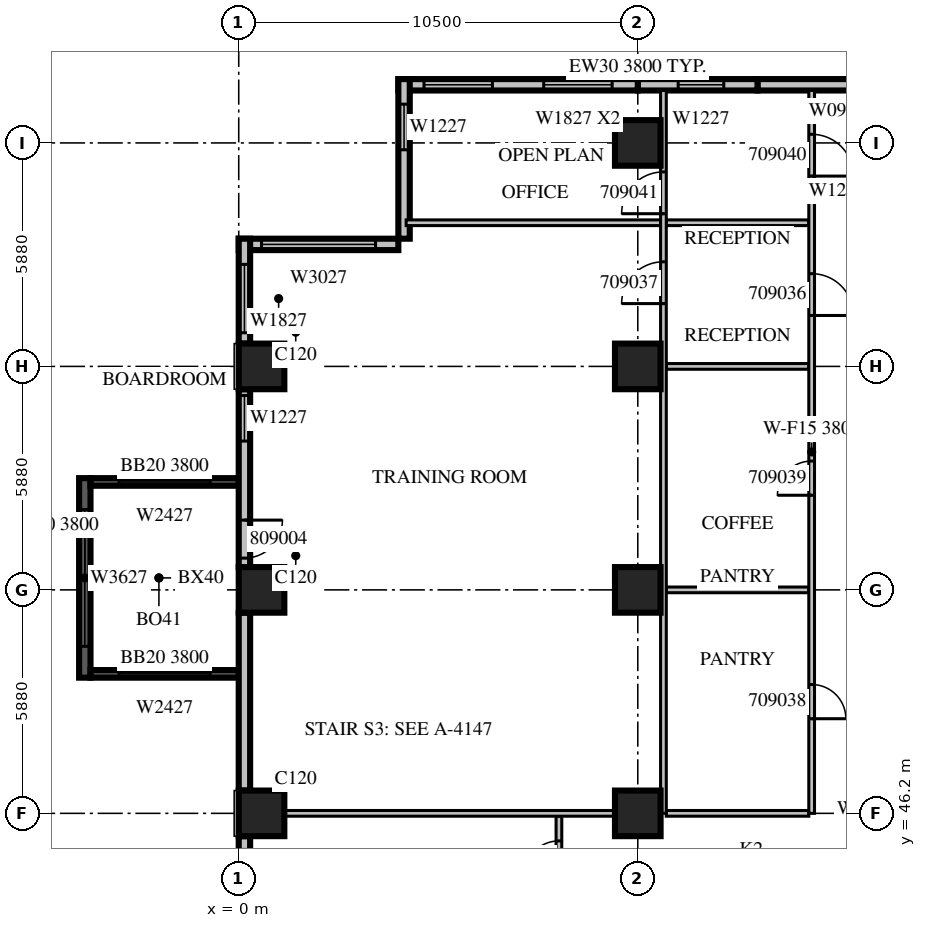
"""IFC4 building model, lengths in metres.
Left out: names, types, materials, properties, quantities, classifications, styles, units other than length and angle.
Written with IfcOpenShell. Run it as: python <this file> out.ifc"""

import sys

from ifc_helpers import new_model, si_unit, direction, frame, frame_2d, origin, origin_2d, place, context, subcontext, project, spatial, rectangle, extrude, source, transform, mapped, element, fill, save


model = new_model("IFC4")
c1 = context("Model", 3, precision=1e-05, world=origin(), true_north=direction((0.0, 1.0)))
c2 = subcontext(c1, "Body", "Model", "MODEL_VIEW")
j1 = project(units=[si_unit("LENGTHUNIT", "METRE"), si_unit("PLANEANGLEUNIT", "RADIAN")], contexts=[c1])
p1 = place(None, origin())
s1 = spatial("IfcSite", under=j1, at=p1, CompositionType="ELEMENT")
p2 = place(p1, origin())
s2 = spatial("IfcBuilding", under=s1, at=p2, CompositionType="ELEMENT")
p3 = place(p2, frame((0.0, 0.0, 48.9)))
s3 = spatial("IfcBuildingStorey", under=s2, at=p3, CompositionType="ELEMENT", Elevation=48.9)
m1 = source(origin(), c2, "Body", "SweptSolid", [
    extrude(rectangle(XDim=1.2, YDim=1.2, at=origin_2d()), origin(), (0.0, 0.0, 1.0), 4.2),
])
for number, where, z_axis, x_axis in (
    (1, (0.6, 46.2, 0.0), (0.0, 0.0, 1.0), (1.0, 0.0, 0.0)),
    (2, (10.5, 46.2, 0.0), (0.0, 0.0, 1.0), (1.0, 0.0, 0.0)),
    (3, (0.6, 52.08, 0.0), (0.0, 0.0, 1.0), (1.0, 0.0, 0.0)),
    (4, (10.5, 52.08, 0.0), (0.0, 0.0, 1.0), (1.0, 0.0, 0.0)),
    (5, (0.6, 57.96, 0.0), (0.0, 0.0, 1.0), (1.0, 0.0, 0.0)),
    (6, (10.5, 57.96, 0.0), (0.0, 0.0, 1.0), (1.0, 0.0, 0.0)),
    (7, (10.5, 63.84, 0.0), (0.0, 0.0, 1.0), (1.0, 0.0, 0.0)),
):
    element("IfcColumn", number, at=place(p3, frame(where, z_axis=z_axis, x_axis=x_axis)), inside=s3, PredefinedType="COLUMN", context=c2, shape_type="MappedRepresentation", body=[
        mapped(m1, transform((0.0, 0.0, 0.0), scale=1.0)),
    ])
p4 = place(p3, frame((-4.05, 55.02, 0.0), z_axis=(0.0, 0.0, 1.0), x_axis=(0.0, -1.0, 0.0)))
e8 = element("IfcWall", 8, at=p4, inside=s3, PredefinedType="SOLIDWALL", context=c2, shape_type="SweptSolid", body=[
    extrude(rectangle(XDim=5.25, YDim=0.3, at=frame_2d((2.625, 0.0))), origin(), (0.0, 0.0, 1.0), 3.8),
])
m2 = source(origin(), c2, "Body", "SweptSolid", [
    extrude(rectangle(XDim=3.6, YDim=2.7, at=frame_2d((1.8, 1.35))), frame((0.0, 0.16, 0.0), z_axis=(0.0, -1.0, 0.0), x_axis=(1.0, 0.0, 0.0)), (0.0, 0.0, 1.0), 0.32),
])
p5 = place(p4, frame((0.825, 0.0, 0.6)))
e9 = element("IfcOpeningElement", 9, at=p5, cuts=e8, PredefinedType="OPENING", context=c2, shape_type="MappedRepresentation", body=[
    mapped(m2, transform((0.0, 0.0, 0.0), scale=1.0)),
])
m3 = source(origin(), c2, "Body", "SweptSolid", [
    extrude(rectangle(XDim=3.9, YDim=0.2, at=frame_2d((1.95, 0.0))), origin(), (0.0, 0.0, 1.0), 3.8),
])
p6 = place(p3, frame((0.0, 54.92, 0.0), z_axis=(0.0, 0.0, 1.0), x_axis=(-1.0, 0.0, 0.0)))
e10 = element("IfcWall", 10, at=p6, inside=s3, PredefinedType="SOLIDWALL", context=c2, shape_type="MappedRepresentation", body=[
    mapped(m3, transform((0.0, 0.0, 0.0), scale=1.0)),
])
m4 = source(origin(), c2, "Body", "SweptSolid", [
    extrude(rectangle(XDim=2.4, YDim=2.7, at=frame_2d((1.2, 1.35))), frame((0.0, 0.11, 0.0), z_axis=(0.0, -1.0, 0.0), x_axis=(1.0, 0.0, 0.0)), (0.0, 0.0, 1.0), 0.22),
])
p7 = place(p6, frame((0.75, 0.0, 0.6)))
e11 = element("IfcOpeningElement", 11, at=p7, cuts=e10, PredefinedType="OPENING", context=c2, shape_type="MappedRepresentation", body=[
    mapped(m4, transform((0.0, 0.0, 0.0), scale=1.0)),
])
p8 = place(p3, frame((0.0, 49.87, 0.0), z_axis=(0.0, 0.0, 1.0), x_axis=(-1.0, 0.0, 0.0)))
e12 = element("IfcWall", 12, at=p8, inside=s3, PredefinedType="SOLIDWALL", context=c2, shape_type="MappedRepresentation", body=[
    mapped(m3, transform((0.0, 0.0, 0.0), scale=1.0)),
])
p9 = place(p8, frame((0.75, 0.0, 0.6)))
e13 = element("IfcOpeningElement", 13, at=p9, cuts=e12, PredefinedType="OPENING", context=c2, shape_type="MappedRepresentation", body=[
    mapped(m4, transform((0.0, 0.0, 0.0), scale=1.0)),
])
m5 = source(origin(), c2, "Body", "SweptSolid", [
    extrude(rectangle(XDim=3.15, YDim=0.3, at=frame_2d((1.575, 0.0))), origin(), (0.0, 0.0, 1.0), 3.8),
])
p10 = place(p3, frame((16.8, 65.37, 0.0), z_axis=(0.0, 0.0, 1.0), x_axis=(-1.0, 0.0, 0.0)))
e14 = element("IfcWall", 14, at=p10, inside=s3, PredefinedType="STANDARD", context=c2, shape_type="MappedRepresentation", body=[
    mapped(m5, transform((0.0, 0.0, 0.0), scale=1.0)),
])
p11 = place(p3, frame((13.65, 65.37, 0.0), z_axis=(0.0, 0.0, 1.0), x_axis=(-1.0, 0.0, 0.0)))
e15 = element("IfcWall", 15, at=p11, inside=s3, PredefinedType="STANDARD", context=c2, shape_type="MappedRepresentation", body=[
    mapped(m5, transform((0.0, 0.0, 0.0), scale=1.0)),
])
m6 = source(origin(), c2, "Body", "SweptSolid", [
    extrude(rectangle(XDim=1.2, YDim=2.7, at=frame_2d((0.6, 1.35))), frame((0.0, 0.16, 0.0), z_axis=(0.0, -1.0, 0.0), x_axis=(1.0, 0.0, 0.0)), (0.0, 0.0, 1.0), 0.32),
])
p12 = place(p11, frame((0.887, 0.0, 0.6)))
e16 = element("IfcOpeningElement", 16, at=p12, cuts=e15, PredefinedType="OPENING", context=c2, shape_type="MappedRepresentation", body=[
    mapped(m6, transform((0.0, 0.0, 0.0), scale=1.0)),
])
m7 = source(origin(), c2, "Body", "SweptSolid", [
    extrude(rectangle(XDim=6.3, YDim=0.3, at=frame_2d((3.15, 0.0))), origin(), (0.0, 0.0, 1.0), 3.8),
])
p13 = place(p3, frame((10.5, 65.37, 0.0), z_axis=(0.0, 0.0, 1.0), x_axis=(-1.0, 0.0, 0.0)))
e17 = element("IfcWall", 17, at=p13, inside=s3, PredefinedType="STANDARD", context=c2, shape_type="MappedRepresentation", body=[
    mapped(m7, transform((0.0, 0.0, 0.0), scale=1.0)),
])
m8 = source(origin(), c2, "Body", "SweptSolid", [
    extrude(rectangle(XDim=1.8, YDim=2.7, at=frame_2d((0.9, 1.35))), frame((0.0, 0.16, 0.0), z_axis=(0.0, -1.0, 0.0), x_axis=(1.0, 0.0, 0.0)), (0.0, 0.0, 1.0), 0.32),
])
p14 = place(p13, frame((0.675, 0.0, 0.6)))
e18 = element("IfcOpeningElement", 18, at=p14, cuts=e17, PredefinedType="OPENING", context=c2, shape_type="MappedRepresentation", body=[
    mapped(m8, transform((0.0, 0.0, 0.0), scale=1.0)),
])
p15 = place(p13, frame((3.825, 0.0, 0.6)))
e19 = element("IfcOpeningElement", 19, at=p15, cuts=e17, PredefinedType="OPENING", context=c2, shape_type="MappedRepresentation", body=[
    mapped(m8, transform((0.0, 0.0, 0.0), scale=1.0)),
])
m9 = source(origin(), c2, "Body", "SweptSolid", [
    extrude(rectangle(XDim=4.2, YDim=0.3, at=frame_2d((2.1, 0.0))), origin(), (0.0, 0.0, 1.0), 3.8),
])
p16 = place(p3, frame((4.35, 65.52, 0.0), z_axis=(0.0, 0.0, 1.0), x_axis=(0.0, -1.0, 0.0)))
e20 = element("IfcWall", 20, at=p16, inside=s3, PredefinedType="STANDARD", context=c2, shape_type="MappedRepresentation", body=[
    mapped(m9, transform((0.0, 0.0, 0.0), scale=1.0)),
])
p17 = place(p16, frame((0.66, 0.0, 0.6)))
e21 = element("IfcOpeningElement", 21, at=p17, cuts=e20, PredefinedType="OPENING", context=c2, shape_type="MappedRepresentation", body=[
    mapped(m6, transform((0.0, 0.0, 0.0), scale=1.0)),
])
p18 = place(p3, frame((4.2, 61.17, 0.0), z_axis=(0.0, 0.0, 1.0), x_axis=(-1.0, 0.0, 0.0)))
e22 = element("IfcWall", 22, at=p18, inside=s3, PredefinedType="STANDARD", context=c2, shape_type="MappedRepresentation", body=[
    mapped(m9, transform((0.0, 0.0, 0.0), scale=1.0)),
])
m10 = source(origin(), c2, "Body", "SweptSolid", [
    extrude(rectangle(XDim=3.0, YDim=2.7, at=frame_2d((1.5, 1.35))), frame((0.0, 0.16, 0.0), z_axis=(0.0, -1.0, 0.0), x_axis=(1.0, 0.0, 0.0)), (0.0, 0.0, 1.0), 0.32),
])
p19 = place(p18, frame((0.6, 0.0, 0.6)))
e23 = element("IfcOpeningElement", 23, at=p19, cuts=e22, PredefinedType="OPENING", context=c2, shape_type="MappedRepresentation", body=[
    mapped(m10, transform((0.0, 0.0, 0.0), scale=1.0)),
])
m11 = source(origin(), c2, "Body", "SweptSolid", [
    extrude(rectangle(XDim=2.76, YDim=0.3, at=frame_2d((1.38, 0.0))), origin(), (0.0, 0.0, 1.0), 3.8),
])
p20 = place(p3, frame((0.15, 61.32, 0.0), z_axis=(0.0, 0.0, 1.0), x_axis=(0.0, -1.0, 0.0)))
e24 = element("IfcWall", 24, at=p20, inside=s3, PredefinedType="STANDARD", context=c2, shape_type="MappedRepresentation", body=[
    mapped(m11, transform((0.0, 0.0, 0.0), scale=1.0)),
])
p21 = place(p20, frame((0.675, 0.0, 0.6)))
e25 = element("IfcOpeningElement", 25, at=p21, cuts=e24, PredefinedType="OPENING", context=c2, shape_type="MappedRepresentation", body=[
    mapped(m8, transform((0.0, 0.0, 0.0), scale=1.0)),
])
m12 = source(origin(), c2, "Body", "SweptSolid", [
    extrude(rectangle(XDim=4.68, YDim=0.3, at=frame_2d((2.34, 0.0))), origin(), (0.0, 0.0, 1.0), 3.8),
])
p22 = place(p3, frame((0.15, 57.36, 0.0), z_axis=(0.0, 0.0, 1.0), x_axis=(0.0, -1.0, 0.0)))
e26 = element("IfcWall", 26, at=p22, inside=s3, PredefinedType="STANDARD", context=c2, shape_type="MappedRepresentation", body=[
    mapped(m12, transform((0.0, 0.0, 0.0), scale=1.0)),
])
p23 = place(p22, frame((0.165, 0.0, 0.6)))
e27 = element("IfcOpeningElement", 27, at=p23, cuts=e26, PredefinedType="OPENING", context=c2, shape_type="MappedRepresentation", body=[
    mapped(m6, transform((0.0, 0.0, 0.0), scale=1.0)),
])
m13 = source(origin(), c2, "Body", "SweptSolid", [
    extrude(rectangle(XDim=1.0, YDim=2.1, at=frame_2d((0.5, 1.05))), frame((0.0, 0.16, 0.0), z_axis=(0.0, -1.0, 0.0), x_axis=(1.0, 0.0, 0.0)), (0.0, 0.0, 1.0), 0.32),
])
p24 = place(p22, frame((3.444, 0.0, 0.0)))
e28 = element("IfcOpeningElement", 28, at=p24, cuts=e26, PredefinedType="OPENING", context=c2, shape_type="MappedRepresentation", body=[
    mapped(m13, transform((0.0, 0.0, 0.0), scale=1.0)),
])
p25 = place(p3, frame((0.15, 51.48, 0.0), z_axis=(0.0, 0.0, 1.0), x_axis=(0.0, -1.0, 0.0)))
e29 = element("IfcWall", 29, at=p25, inside=s3, PredefinedType="STANDARD", context=c2, shape_type="MappedRepresentation", body=[
    mapped(m12, transform((0.0, 0.0, 0.0), scale=1.0)),
])
m14 = source(origin(), c2, "Body", "SweptSolid", [
    extrude(rectangle(XDim=1.6, YDim=0.3, at=frame_2d((0.8, 0.0))), origin(), (0.0, 0.0, 1.0), 3.8),
])
p26 = place(p3, frame((0.15, 45.6, 0.0), z_axis=(0.0, 0.0, 1.0), x_axis=(0.0, -1.0, 0.0)))
e30 = element("IfcWall", 30, at=p26, inside=s3, PredefinedType="STANDARD", context=c2, shape_type="MappedRepresentation", body=[
    mapped(m14, transform((0.0, 0.0, 0.0), scale=1.0)),
])
m15 = source(origin(), c2, "Body", "SweptSolid", [
    extrude(rectangle(XDim=0.9, YDim=2.7, at=frame_2d((0.45, 1.35))), frame((0.0, 0.16, 0.0), z_axis=(0.0, -1.0, 0.0), x_axis=(1.0, 0.0, 0.0)), (0.0, 0.0, 1.0), 0.32),
])
p27 = place(p26, frame((0.35, 0.0, 0.6)))
e31 = element("IfcOpeningElement", 31, at=p27, cuts=e30, PredefinedType="OPENING", context=c2, shape_type="MappedRepresentation", body=[
    mapped(m15, transform((0.0, 0.0, 0.0), scale=1.0)),
])
m16 = source(origin(), c2, "Body", "SweptSolid", [
    extrude(rectangle(XDim=2.2, YDim=0.15, at=frame_2d((1.1, 0.0))), origin(), (0.0, 0.0, 1.0), 3.8),
])
p28 = place(p3, frame((8.425, 43.925, 0.0), z_axis=(0.0, 0.0, 1.0), x_axis=(0.0, 1.0, 0.0)))
e32 = element("IfcWall", 32, at=p28, inside=s3, PredefinedType="PARTITIONING", context=c2, shape_type="MappedRepresentation", body=[
    mapped(m16, transform((0.0, 0.0, 0.0), scale=1.0)),
])
m17 = source(origin(), c2, "Body", "SweptSolid", [
    extrude(rectangle(XDim=0.9, YDim=2.1, at=frame_2d((0.45, 1.05))), frame((0.0, 0.085, 0.0), z_axis=(0.0, -1.0, 0.0), x_axis=(1.0, 0.0, 0.0)), (0.0, 0.0, 1.0), 0.17),
])
p29 = place(p28, frame((0.65, 0.0, 0.0)))
e33 = element("IfcOpeningElement", 33, at=p29, cuts=e32, PredefinedType="OPENING", context=c2, shape_type="MappedRepresentation", body=[
    mapped(m17, transform((0.0, 0.0, 0.0), scale=1.0)),
])
m18 = source(origin(), c2, "Body", "SweptSolid", [
    extrude(rectangle(XDim=3.75, YDim=0.15, at=frame_2d((1.875, 0.0))), origin(), (0.0, 0.0, 1.0), 3.8),
])
for number, where, z_axis, x_axis in (
    (34, (15.0, 52.08, 0.0), (0.0, 0.0, 1.0), (-1.0, 0.0, 0.0)),
    (35, (15.0, 57.96, 0.0), (0.0, 0.0, 1.0), (-1.0, 0.0, 0.0)),
):
    element("IfcWall", number, at=place(p3, frame(where, z_axis=z_axis, x_axis=x_axis)), inside=s3, PredefinedType="PARTITIONING", context=c2, shape_type="MappedRepresentation", body=[
        mapped(m18, transform((0.0, 0.0, 0.0), scale=1.0)),
    ])
m19 = source(origin(), c2, "Body", "SweptSolid", [
    extrude(rectangle(XDim=8.702, YDim=0.15, at=frame_2d((4.351, 0.0))), origin(), (0.0, 0.0, 1.0), 3.8),
])
p30 = place(p3, frame((9.901, 46.2, 0.0), z_axis=(0.0, 0.0, 1.0), x_axis=(-1.0, 0.0, 0.0)))
e36 = element("IfcWall", 36, at=p30, inside=s3, PredefinedType="PARTITIONING", context=c2, shape_type="MappedRepresentation", body=[
    mapped(m19, transform((0.0, 0.0, 0.0), scale=1.0)),
])
p31 = place(p3, frame((15.0, 46.2, 0.0), z_axis=(0.0, 0.0, 1.0), x_axis=(-1.0, 0.0, 0.0)))
e37 = element("IfcWall", 37, at=p31, inside=s3, PredefinedType="PARTITIONING", context=c2, shape_type="MappedRepresentation", body=[
    mapped(m18, transform((0.0, 0.0, 0.0), scale=1.0)),
])
m20 = source(origin(), c2, "Body", "SweptSolid", [
    extrude(rectangle(XDim=6.695, YDim=0.15, at=frame_2d((3.348, 0.0))), origin(), (0.0, 0.0, 1.0), 3.8),
])
p32 = place(p3, frame((11.1, 61.74, 0.0), z_axis=(0.0, 0.0, 1.0), x_axis=(-1.0, 0.0, 0.0)))
e38 = element("IfcWall", 38, at=p32, inside=s3, PredefinedType="PARTITIONING", context=c2, shape_type="MappedRepresentation", body=[
    mapped(m20, transform((0.0, 0.0, 0.0), scale=1.0)),
])
p33 = place(p3, frame((15.0, 61.74, 0.0), z_axis=(0.0, 0.0, 1.0), x_axis=(-1.0, 0.0, 0.0)))
e39 = element("IfcWall", 39, at=p33, inside=s3, PredefinedType="PARTITIONING", context=c2, shape_type="MappedRepresentation", body=[
    mapped(m18, transform((0.0, 0.0, 0.0), scale=1.0)),
])
m21 = source(origin(), c2, "Body", "SweptSolid", [
    extrude(rectangle(XDim=19.02, YDim=0.15, at=frame_2d((9.51, 0.0))), origin(), (0.0, 0.0, 1.0), 3.8),
])
p34 = place(p3, frame((11.175, 46.2, 0.0), z_axis=(0.0, 0.0, 1.0), x_axis=(0.0, 1.0, 0.0)))
e40 = element("IfcWall", 40, at=p34, inside=s3, PredefinedType="PARTITIONING", context=c2, shape_type="MappedRepresentation", body=[
    mapped(m21, transform((0.0, 0.0, 0.0), scale=1.0)),
])
m22 = source(origin(), c2, "Body", "SweptSolid", [
    extrude(rectangle(XDim=1.1, YDim=2.1, at=frame_2d((0.55, 1.05))), frame((0.0, 0.085, 0.0), z_axis=(0.0, -1.0, 0.0), x_axis=(1.0, 0.0, 0.0)), (0.0, 0.0, 1.0), 0.17),
])
p35 = place(p34, frame((13.412, 0.0, 0.0)))
e41 = element("IfcOpeningElement", 41, at=p35, cuts=e40, PredefinedType="OPENING", context=c2, shape_type="MappedRepresentation", body=[
    mapped(m22, transform((0.0, 0.0, 0.0), scale=1.0)),
])
p36 = place(p34, frame((15.777, 0.0, 0.0)))
e42 = element("IfcOpeningElement", 42, at=p36, cuts=e40, PredefinedType="OPENING", context=c2, shape_type="MappedRepresentation", body=[
    mapped(m22, transform((0.0, 0.0, 0.0), scale=1.0)),
])
p37 = place(p3, frame((15.075, 46.2, 0.0), z_axis=(0.0, 0.0, 1.0), x_axis=(0.0, 1.0, 0.0)))
e43 = element("IfcWall", 43, at=p37, inside=s3, PredefinedType="PARTITIONING", context=c2, shape_type="MappedRepresentation", body=[
    mapped(m21, transform((0.0, 0.0, 0.0), scale=1.0)),
])
p38 = place(p37, frame((13.1, 0.0, 0.0)))
e44 = element("IfcOpeningElement", 44, at=p38, cuts=e43, PredefinedType="OPENING", context=c2, shape_type="MappedRepresentation", body=[
    mapped(m22, transform((0.0, 0.0, 0.0), scale=1.0)),
])
p39 = place(p37, frame((2.49, 0.0, 0.0)))
e45 = element("IfcOpeningElement", 45, at=p39, cuts=e43, PredefinedType="OPENING", context=c2, shape_type="MappedRepresentation", body=[
    mapped(m17, transform((0.0, 0.0, 0.0), scale=1.0)),
])
p40 = place(p37, frame((8.37, 0.0, 0.0)))
e46 = element("IfcOpeningElement", 46, at=p40, cuts=e43, PredefinedType="OPENING", context=c2, shape_type="MappedRepresentation", body=[
    mapped(m17, transform((0.0, 0.0, 0.0), scale=1.0)),
])
p41 = place(p37, frame((16.767, 0.0, 0.0)))
e47 = element("IfcOpeningElement", 47, at=p41, cuts=e43, PredefinedType="OPENING", context=c2, shape_type="MappedRepresentation", body=[
    mapped(m22, transform((0.0, 0.0, 0.0), scale=1.0)),
])
m23 = source(origin(), c2, "Body", "SweptSolid", [
    extrude(rectangle(XDim=3.6, YDim=2.7, at=frame_2d((1.8, 1.35))), frame((0.0, 0.03, 0.0), z_axis=(0.0, -1.0, 0.0), x_axis=(1.0, 0.0, 0.0)), (0.0, 0.0, 1.0), 0.06),
])
p42 = place(p5, origin())
e48 = element("IfcWindow", 48, at=p42, inside=s3, PartitioningType="SINGLE_PANEL", PredefinedType="WINDOW", context=c2, shape_type="MappedRepresentation", body=[
    mapped(m23, transform((0.0, 0.0, 0.0), scale=1.0)),
])
fill(e9, e48)
m24 = source(origin(), c2, "Body", "SweptSolid", [
    extrude(rectangle(XDim=2.4, YDim=2.7, at=frame_2d((1.2, 1.35))), frame((0.0, 0.03, 0.0), z_axis=(0.0, -1.0, 0.0), x_axis=(1.0, 0.0, 0.0)), (0.0, 0.0, 1.0), 0.06),
])
p43 = place(p7, origin())
e49 = element("IfcWindow", 49, at=p43, inside=s3, PartitioningType="SINGLE_PANEL", PredefinedType="WINDOW", context=c2, shape_type="MappedRepresentation", body=[
    mapped(m24, transform((0.0, 0.0, 0.0), scale=1.0)),
])
fill(e11, e49)
p44 = place(p9, origin())
e50 = element("IfcWindow", 50, at=p44, inside=s3, PartitioningType="SINGLE_PANEL", PredefinedType="WINDOW", context=c2, shape_type="MappedRepresentation", body=[
    mapped(m24, transform((0.0, 0.0, 0.0), scale=1.0)),
])
fill(e13, e50)
m25 = source(origin(), c2, "Body", "SweptSolid", [
    extrude(rectangle(XDim=1.2, YDim=2.7, at=frame_2d((0.6, 1.35))), frame((0.0, 0.03, 0.0), z_axis=(0.0, -1.0, 0.0), x_axis=(1.0, 0.0, 0.0)), (0.0, 0.0, 1.0), 0.06),
])
p45 = place(p12, origin())
e51 = element("IfcWindow", 51, at=p45, inside=s3, PartitioningType="SINGLE_PANEL", PredefinedType="WINDOW", context=c2, shape_type="MappedRepresentation", body=[
    mapped(m25, transform((0.0, 0.0, 0.0), scale=1.0)),
])
fill(e16, e51)
m26 = source(origin(), c2, "Body", "SweptSolid", [
    extrude(rectangle(XDim=1.8, YDim=2.7, at=frame_2d((0.9, 1.35))), frame((0.0, 0.03, 0.0), z_axis=(0.0, -1.0, 0.0), x_axis=(1.0, 0.0, 0.0)), (0.0, 0.0, 1.0), 0.06),
])
p46 = place(p14, origin())
e52 = element("IfcWindow", 52, at=p46, inside=s3, PartitioningType="SINGLE_PANEL", PredefinedType="WINDOW", context=c2, shape_type="MappedRepresentation", body=[
    mapped(m26, transform((0.0, 0.0, 0.0), scale=1.0)),
])
fill(e18, e52)
p47 = place(p15, origin())
e53 = element("IfcWindow", 53, at=p47, inside=s3, PartitioningType="SINGLE_PANEL", PredefinedType="WINDOW", context=c2, shape_type="MappedRepresentation", body=[
    mapped(m26, transform((0.0, 0.0, 0.0), scale=1.0)),
])
fill(e19, e53)
p48 = place(p17, origin())
e54 = element("IfcWindow", 54, at=p48, inside=s3, PartitioningType="SINGLE_PANEL", PredefinedType="WINDOW", context=c2, shape_type="MappedRepresentation", body=[
    mapped(m25, transform((0.0, 0.0, 0.0), scale=1.0)),
])
fill(e21, e54)
m27 = source(origin(), c2, "Body", "SweptSolid", [
    extrude(rectangle(XDim=3.0, YDim=2.7, at=frame_2d((1.5, 1.35))), frame((0.0, 0.03, 0.0), z_axis=(0.0, -1.0, 0.0), x_axis=(1.0, 0.0, 0.0)), (0.0, 0.0, 1.0), 0.06),
])
p49 = place(p19, origin())
e55 = element("IfcWindow", 55, at=p49, inside=s3, PartitioningType="SINGLE_PANEL", PredefinedType="WINDOW", context=c2, shape_type="MappedRepresentation", body=[
    mapped(m27, transform((0.0, 0.0, 0.0), scale=1.0)),
])
fill(e23, e55)
p50 = place(p21, origin())
e56 = element("IfcWindow", 56, at=p50, inside=s3, PartitioningType="SINGLE_PANEL", PredefinedType="WINDOW", context=c2, shape_type="MappedRepresentation", body=[
    mapped(m26, transform((0.0, 0.0, 0.0), scale=1.0)),
])
fill(e25, e56)
p51 = place(p23, origin())
e57 = element("IfcWindow", 57, at=p51, inside=s3, PartitioningType="SINGLE_PANEL", PredefinedType="WINDOW", context=c2, shape_type="MappedRepresentation", body=[
    mapped(m25, transform((0.0, 0.0, 0.0), scale=1.0)),
])
fill(e27, e57)
m28 = source(origin(), c2, "Body", "SweptSolid", [
    extrude(rectangle(XDim=0.9, YDim=2.1, at=frame_2d((0.45, 1.05))), frame((0.0, 0.025, 0.0), z_axis=(0.0, -1.0, 0.0), x_axis=(1.0, 0.0, 0.0)), (0.0, 0.0, 1.0), 0.05),
])
p52 = place(p29, origin())
e58 = element("IfcDoor", 58, at=p52, inside=s3, OperationType="SINGLE_SWING_LEFT", PredefinedType="DOOR", context=c2, shape_type="MappedRepresentation", body=[
    mapped(m28, transform((0.0, 0.0, 0.0), scale=1.0)),
])
fill(e33, e58)
m29 = source(origin(), c2, "Body", "SweptSolid", [
    extrude(rectangle(XDim=1.1, YDim=2.1, at=frame_2d((0.55, 1.05))), frame((0.0, 0.025, 0.0), z_axis=(0.0, -1.0, 0.0), x_axis=(1.0, 0.0, 0.0)), (0.0, 0.0, 1.0), 0.05),
])
p53 = place(p38, origin())
e59 = element("IfcDoor", 59, at=p53, inside=s3, OperationType="SINGLE_SWING_RIGHT", PredefinedType="DOOR", context=c2, shape_type="MappedRepresentation", body=[
    mapped(m29, transform((0.0, 0.0, 0.0), scale=1.0)),
])
fill(e44, e59)
p54 = place(p35, origin())
e60 = element("IfcDoor", 60, at=p54, inside=s3, OperationType="SINGLE_SWING_LEFT", PredefinedType="DOOR", context=c2, shape_type="MappedRepresentation", body=[
    mapped(m29, transform((0.0, 0.0, 0.0), scale=1.0)),
])
fill(e41, e60)
p55 = place(p39, origin())
e61 = element("IfcDoor", 61, at=p55, inside=s3, OperationType="SINGLE_SWING_RIGHT", PredefinedType="DOOR", context=c2, shape_type="MappedRepresentation", body=[
    mapped(m28, transform((0.0, 0.0, 0.0), scale=1.0)),
])
fill(e45, e61)
p56 = place(p40, origin())
e62 = element("IfcDoor", 62, at=p56, inside=s3, OperationType="SINGLE_SWING_LEFT", PredefinedType="DOOR", context=c2, shape_type="MappedRepresentation", body=[
    mapped(m28, transform((0.0, 0.0, 0.0), scale=1.0)),
])
fill(e46, e62)
p57 = place(p41, origin())
e63 = element("IfcDoor", 63, at=p57, inside=s3, OperationType="SINGLE_SWING_RIGHT", PredefinedType="DOOR", context=c2, shape_type="MappedRepresentation", body=[
    mapped(m29, transform((0.0, 0.0, 0.0), scale=1.0)),
])
fill(e47, e63)
p58 = place(p36, origin())
e64 = element("IfcDoor", 64, at=p58, inside=s3, OperationType="SINGLE_SWING_LEFT", PredefinedType="DOOR", context=c2, shape_type="MappedRepresentation", body=[
    mapped(m29, transform((0.0, 0.0, 0.0), scale=1.0)),
])
fill(e42, e64)
m30 = source(origin(), c2, "Body", "SweptSolid", [
    extrude(rectangle(XDim=1.0, YDim=2.1, at=frame_2d((0.5, 1.05))), frame((0.0, 0.025, 0.0), z_axis=(0.0, -1.0, 0.0), x_axis=(1.0, 0.0, 0.0)), (0.0, 0.0, 1.0), 0.05),
])
p59 = place(p24, origin())
e65 = element("IfcDoor", 65, at=p59, inside=s3, OperationType="SINGLE_SWING_LEFT", PredefinedType="DOOR", context=c2, shape_type="MappedRepresentation", body=[
    mapped(m30, transform((0.0, 0.0, 0.0), scale=1.0)),
])
fill(e28, e65)
save(model, sys.argv[1])
